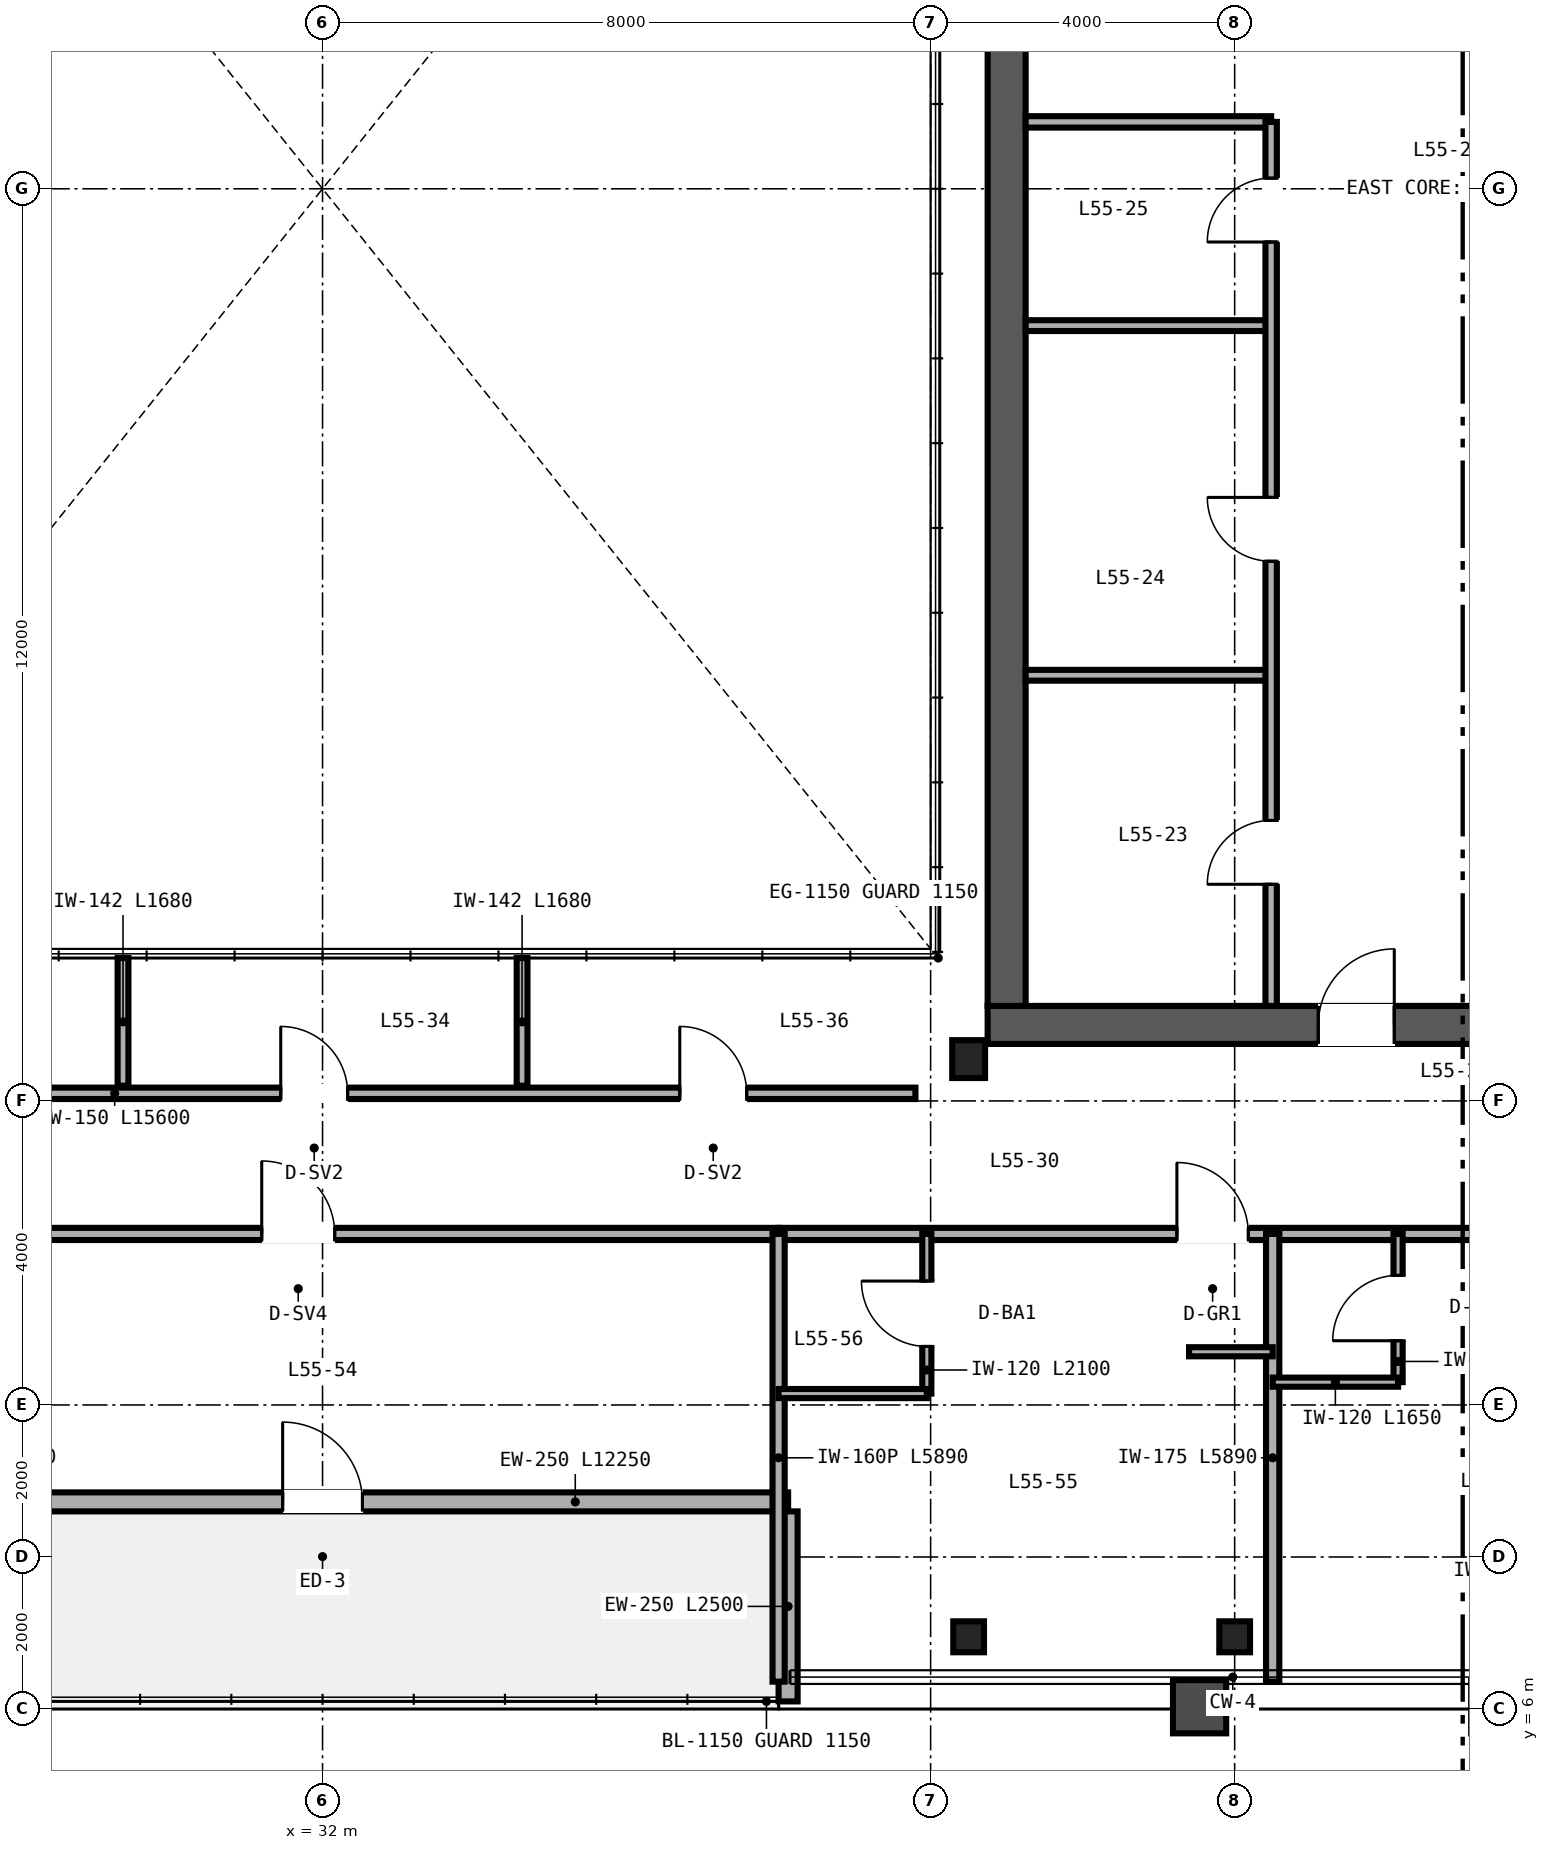
"""IFC4 building model, lengths in metres.
Left out: names, types, materials, properties, quantities, classifications, styles, units other than length and angle.
Written with IfcOpenShell. Run it as: python <this file> out.ifc"""

import sys

from ifc_helpers import new_model, si_unit, direction, frame, frame_2d, origin, origin_2d, place, context, subcontext, project, spatial, rectangle, i_section, extrude, source, transform, mapped, element, fill, save


model = new_model("IFC4")
c1 = context("Model", 3, precision=1e-05, world=origin(), true_north=direction((0.0, 1.0)))
c2 = subcontext(c1, "Body", "Model", "MODEL_VIEW")
j1 = project(units=[si_unit("LENGTHUNIT", "METRE"), si_unit("PLANEANGLEUNIT", "RADIAN")], contexts=[c1])
p1 = place(None, origin())
s1 = spatial("IfcSite", under=j1, at=p1, CompositionType="ELEMENT")
p2 = place(p1, origin())
s2 = spatial("IfcBuilding", under=s1, at=p2, CompositionType="ELEMENT")
p3 = place(p2, frame((0.0, 0.0, 217.2)))
s3 = spatial("IfcBuildingStorey", under=s2, at=p3, CompositionType="ELEMENT", Elevation=217.2)
p4 = place(p3, frame((40.75, 15.0, 0.0), z_axis=(0.0, 0.0, 1.0), x_axis=(1.0, 0.0, 0.0)))
e1 = element("IfcWall", 1, at=p4, inside=s3, PredefinedType="SHEAR", context=c2, shape_type="SweptSolid", body=[
    extrude(rectangle(XDim=12.5, YDim=0.5, at=frame_2d((6.25, 0.0))), origin(), (0.0, 0.0, 1.0), 3.28),
])
p5 = place(p4, frame((4.35, 0.0, 0.0)))
e2 = element("IfcOpeningElement", 2, at=p5, cuts=e1, PredefinedType="OPENING", context=c2, shape_type="SweptSolid", body=[
    extrude(rectangle(XDim=1.0, YDim=2.15, at=frame_2d((0.5, 1.075))), frame((0.0, 0.26, 0.0), z_axis=(0.0, -1.0, 0.0), x_axis=(1.0, 0.0, 0.0)), (0.0, 0.0, 1.0), 0.52),
])
p6 = place(p3, frame((41.0, 15.25, 0.0), z_axis=(0.0, 0.0, 1.0), x_axis=(0.0, 1.0, 0.0)))
e3 = element("IfcWall", 3, at=p6, inside=s3, PredefinedType="SHEAR", context=c2, shape_type="SweptSolid", body=[
    extrude(rectangle(XDim=21.5, YDim=0.5, at=frame_2d((10.75, 0.0))), origin(), (0.0, 0.0, 1.0), 3.28),
])
m1 = source(origin(), c2, "Body", "SweptSolid", [
    extrude(i_section(OverallWidth=0.432, OverallDepth=0.498, WebThickness=0.056, FlangeThickness=0.089, FilletRadius=0.025, at=origin_2d()), origin(), (0.0, 0.0, 1.0), 3.28),
])
p7 = place(p3, frame((40.5, 14.55, 0.0), z_axis=(0.0, 0.0, 1.0), x_axis=(1.0, 0.0, 0.0)))
e4 = element("IfcColumn", 4, at=p7, inside=s3, PredefinedType="COLUMN", context=c2, shape_type="MappedRepresentation", body=[
    mapped(m1, transform((0.0, 0.0, 0.0), scale=1.0)),
])
m2 = source(origin(), c2, "Body", "SweptSolid", [
    extrude(i_section(OverallWidth=0.404, OverallDepth=0.407, WebThickness=0.027, FlangeThickness=0.044, FilletRadius=0.025, at=origin_2d()), origin(), (0.0, 0.0, 1.0), 3.28),
])
for number, where, z_axis, x_axis in (
    (5, (40.5, 6.95, 0.0), (0.0, 0.0, 1.0), (1.0, 0.0, 0.0)),
    (6, (44.0, 6.95, 0.0), (0.0, 0.0, 1.0), (1.0, 0.0, 0.0)),
):
    element("IfcColumn", number, at=place(p3, frame(where, z_axis=z_axis, x_axis=x_axis)), inside=s3, PredefinedType="COLUMN", context=c2, shape_type="MappedRepresentation", body=[
        mapped(m2, transform((0.0, 0.0, 0.0), scale=1.0)),
    ])
p8 = place(p3, frame((25.875, 8.725, 0.0), z_axis=(0.0, 0.0, 1.0), x_axis=(1.0, 0.0, 0.0)))
e7 = element("IfcWall", 7, at=p8, inside=s3, PredefinedType="SOLIDWALL", context=c2, shape_type="SweptSolid", body=[
    extrude(rectangle(XDim=12.25, YDim=0.25, at=frame_2d((6.125, 0.0))), origin(), (0.0, 0.0, 1.0), 3.28),
])
p9 = place(p8, frame((5.6, 0.0, 0.0)))
e8 = element("IfcOpeningElement", 8, at=p9, cuts=e7, PredefinedType="OPENING", context=c2, shape_type="SweptSolid", body=[
    extrude(rectangle(XDim=1.05, YDim=2.15, at=frame_2d((0.525, 1.075))), frame((0.0, 0.135, 0.0), z_axis=(0.0, -1.0, 0.0), x_axis=(1.0, 0.0, 0.0)), (0.0, 0.0, 1.0), 0.27),
])
p10 = place(p3, frame((38.125, 6.1, 0.0), z_axis=(0.0, 0.0, 1.0), x_axis=(0.0, 1.0, 0.0)))
e9 = element("IfcWall", 9, at=p10, inside=s3, PredefinedType="SOLIDWALL", context=c2, shape_type="SweptSolid", body=[
    extrude(rectangle(XDim=2.5, YDim=0.25, at=frame_2d((1.25, 0.0))), origin(), (0.0, 0.0, 1.0), 2.353),
])
p11 = place(p3, frame((41.25, 26.88, 0.0), z_axis=(0.0, 0.0, 1.0), x_axis=(1.0, 0.0, 0.0)))
e10 = element("IfcWall", 10, at=p11, inside=s3, PredefinedType="PARTITIONING", context=c2, shape_type="SweptSolid", body=[
    extrude(rectangle(XDim=3.23, YDim=0.15, at=frame_2d((1.615, 0.0))), origin(), (0.0, 0.0, 1.0), 3.28),
])
for number, where, z_axis, x_axis in (
    (11, (41.25, 19.6, 0.0), (0.0, 0.0, 1.0), (1.0, 0.0, 0.0)),
    (12, (41.25, 24.2, 0.0), (0.0, 0.0, 1.0), (1.0, 0.0, 0.0)),
):
    element("IfcWall", number, at=place(p3, frame(where, z_axis=z_axis, x_axis=x_axis)), inside=s3, PredefinedType="PARTITIONING", context=c2, shape_type="SweptSolid", body=[
        extrude(rectangle(XDim=3.23, YDim=0.142, at=frame_2d((1.615, 0.0))), origin(), (0.0, 0.0, 1.0), 3.28),
    ])
p12 = place(p3, frame((44.48, 15.25, 0.0), z_axis=(0.0, 0.0, 1.0), x_axis=(0.0, 1.0, 0.0)))
e13 = element("IfcWall", 13, at=p12, inside=s3, PredefinedType="PARTITIONING", context=c2, shape_type="SweptSolid", body=[
    extrude(rectangle(XDim=11.63, YDim=0.15, at=frame_2d((5.815, 0.0))), origin(), (0.0, 0.0, 1.0), 3.28),
])
p13 = place(p12, frame((1.6, 0.0, 0.0)))
e14 = element("IfcOpeningElement", 14, at=p13, cuts=e13, PredefinedType="OPENING", context=c2, shape_type="SweptSolid", body=[
    extrude(rectangle(XDim=0.84, YDim=2.1, at=frame_2d((0.42, 1.05))), frame((0.0, 0.085, 0.0), z_axis=(0.0, -1.0, 0.0), x_axis=(1.0, 0.0, 0.0)), (0.0, 0.0, 1.0), 0.17),
])
p14 = place(p12, frame((5.85, 0.0, 0.0)))
e15 = element("IfcOpeningElement", 15, at=p14, cuts=e13, PredefinedType="OPENING", context=c2, shape_type="SweptSolid", body=[
    extrude(rectangle(XDim=0.84, YDim=2.1, at=frame_2d((0.42, 1.05))), frame((0.0, 0.085, 0.0), z_axis=(0.0, -1.0, 0.0), x_axis=(1.0, 0.0, 0.0)), (0.0, 0.0, 1.0), 0.17),
])
p15 = place(p12, frame((10.05, 0.0, 0.0)))
e16 = element("IfcOpeningElement", 16, at=p15, cuts=e13, PredefinedType="OPENING", context=c2, shape_type="SweptSolid", body=[
    extrude(rectangle(XDim=0.84, YDim=2.1, at=frame_2d((0.42, 1.05))), frame((0.0, 0.085, 0.0), z_axis=(0.0, -1.0, 0.0), x_axis=(1.0, 0.0, 0.0)), (0.0, 0.0, 1.0), 0.17),
])
p16 = place(p3, frame((24.2, 14.1, 0.0), z_axis=(0.0, 0.0, 1.0), x_axis=(1.0, 0.0, 0.0)))
e17 = element("IfcWall", 17, at=p16, inside=s3, PredefinedType="PARTITIONING", context=c2, shape_type="SweptSolid", body=[
    extrude(rectangle(XDim=15.6, YDim=0.15, at=frame_2d((7.8, 0.0))), origin(), (0.0, 0.0, 1.0), 3.28),
])
p17 = place(p16, frame((2.0, 0.0, 0.0)))
e18 = element("IfcOpeningElement", 18, at=p17, cuts=e17, PredefinedType="OPENING", context=c2, shape_type="SweptSolid", body=[
    extrude(rectangle(XDim=0.88, YDim=2.15, at=frame_2d((0.44, 1.075))), frame((0.0, 0.085, 0.0), z_axis=(0.0, -1.0, 0.0), x_axis=(1.0, 0.0, 0.0)), (0.0, 0.0, 1.0), 0.17),
])
p18 = place(p16, frame((7.25, 0.0, 0.0)))
e19 = element("IfcOpeningElement", 19, at=p18, cuts=e17, PredefinedType="OPENING", context=c2, shape_type="SweptSolid", body=[
    extrude(rectangle(XDim=0.88, YDim=2.15, at=frame_2d((0.44, 1.075))), frame((0.0, 0.085, 0.0), z_axis=(0.0, -1.0, 0.0), x_axis=(1.0, 0.0, 0.0)), (0.0, 0.0, 1.0), 0.17),
])
p19 = place(p16, frame((12.5, 0.0, 0.0)))
e20 = element("IfcOpeningElement", 20, at=p19, cuts=e17, PredefinedType="OPENING", context=c2, shape_type="SweptSolid", body=[
    extrude(rectangle(XDim=0.88, YDim=2.15, at=frame_2d((0.44, 1.075))), frame((0.0, 0.085, 0.0), z_axis=(0.0, -1.0, 0.0), x_axis=(1.0, 0.0, 0.0)), (0.0, 0.0, 1.0), 0.17),
])
for number, where, z_axis, x_axis in (
    (21, (29.375, 14.2, 0.0), (0.0, 0.0, 1.0), (0.0, 1.0, 0.0)),
    (22, (34.625, 14.2, 0.0), (0.0, 0.0, 1.0), (0.0, 1.0, 0.0)),
):
    element("IfcWall", number, at=place(p3, frame(where, z_axis=z_axis, x_axis=x_axis)), inside=s3, PredefinedType="PARTITIONING", context=c2, shape_type="SweptSolid", body=[
        extrude(rectangle(XDim=1.68, YDim=0.142, at=frame_2d((0.84, 0.0))), origin(), (0.0, 0.0, 1.0), 3.28),
    ])
p20 = place(p3, frame((26.0, 12.25, 0.0), z_axis=(0.0, 0.0, 1.0), x_axis=(1.0, 0.0, 0.0)))
e23 = element("IfcWall", 23, at=p20, inside=s3, PredefinedType="PARTITIONING", context=c2, shape_type="SweptSolid", body=[
    extrude(rectangle(XDim=12.0, YDim=0.16, at=frame_2d((6.0, 0.0))), origin(), (0.0, 0.0, 1.0), 3.28),
])
p21 = place(p20, frame((5.2, 0.0, 0.0)))
e24 = element("IfcOpeningElement", 24, at=p21, cuts=e23, PredefinedType="OPENING", context=c2, shape_type="SweptSolid", body=[
    extrude(rectangle(XDim=0.96, YDim=2.15, at=frame_2d((0.48, 1.075))), frame((0.0, 0.09, 0.0), z_axis=(0.0, -1.0, 0.0), x_axis=(1.0, 0.0, 0.0)), (0.0, 0.0, 1.0), 0.18),
])
p22 = place(p3, frame((38.0, 12.25, 0.0), z_axis=(0.0, 0.0, 1.0), x_axis=(1.0, 0.0, 0.0)))
e25 = element("IfcWall", 25, at=p22, inside=s3, PredefinedType="PARTITIONING", context=c2, shape_type="SweptSolid", body=[
    extrude(rectangle(XDim=12.0, YDim=0.16, at=frame_2d((6.0, 0.0))), origin(), (0.0, 0.0, 1.0), 2.823),
])
p23 = place(p22, frame((5.24, 0.0, 0.0)))
e26 = element("IfcOpeningElement", 26, at=p23, cuts=e25, PredefinedType="OPENING", context=c2, shape_type="SweptSolid", body=[
    extrude(rectangle(XDim=0.94, YDim=2.15, at=frame_2d((0.47, 1.075))), frame((0.0, 0.09, 0.0), z_axis=(0.0, -1.0, 0.0), x_axis=(1.0, 0.0, 0.0)), (0.0, 0.0, 1.0), 0.18),
])
p24 = place(p22, frame((10.74, 0.0, 0.0)))
e27 = element("IfcOpeningElement", 27, at=p24, cuts=e25, PredefinedType="OPENING", context=c2, shape_type="SweptSolid", body=[
    extrude(rectangle(XDim=0.94, YDim=2.15, at=frame_2d((0.47, 1.075))), frame((0.0, 0.09, 0.0), z_axis=(0.0, -1.0, 0.0), x_axis=(1.0, 0.0, 0.0)), (0.0, 0.0, 1.0), 0.18),
])
p25 = place(p3, frame((38.0, 6.36, 0.0), z_axis=(0.0, 0.0, 1.0), x_axis=(0.0, 1.0, 0.0)))
e28 = element("IfcWall", 28, at=p25, inside=s3, PredefinedType="PARTITIONING", context=c2, shape_type="SweptSolid", body=[
    extrude(rectangle(XDim=5.89, YDim=0.16, at=frame_2d((2.945, 0.0))), origin(), (0.0, 0.0, 1.0), 2.36),
])
p26 = place(p3, frame((44.5, 6.36, 0.0), z_axis=(0.0, 0.0, 1.0), x_axis=(0.0, 1.0, 0.0)))
e29 = element("IfcWall", 29, at=p26, inside=s3, PredefinedType="PARTITIONING", context=c2, shape_type="SweptSolid", body=[
    extrude(rectangle(XDim=5.89, YDim=0.175, at=frame_2d((2.945, 0.0))), origin(), (0.0, 0.0, 1.0), 2.587),
])
p27 = place(p3, frame((39.95, 10.15, 0.0), z_axis=(0.0, 0.0, 1.0), x_axis=(0.0, 1.0, 0.0)))
e30 = element("IfcWall", 30, at=p27, inside=s3, PredefinedType="PARTITIONING", context=c2, shape_type="SweptSolid", body=[
    extrude(rectangle(XDim=2.1, YDim=0.12, at=frame_2d((1.05, 0.0))), origin(), (0.0, 0.0, 1.0), 3.28),
])
p28 = place(p27, frame((0.62, 0.0, 0.0)))
e31 = element("IfcOpeningElement", 31, at=p28, cuts=e30, PredefinedType="OPENING", context=c2, shape_type="SweptSolid", body=[
    extrude(rectangle(XDim=0.86, YDim=2.1, at=frame_2d((0.43, 1.05))), frame((0.0, 0.07, 0.0), z_axis=(0.0, -1.0, 0.0), x_axis=(1.0, 0.0, 0.0)), (0.0, 0.0, 1.0), 0.14),
])
p29 = place(p3, frame((38.0, 10.15, 0.0), z_axis=(0.0, 0.0, 1.0), x_axis=(1.0, 0.0, 0.0)))
e32 = element("IfcWall", 32, at=p29, inside=s3, PredefinedType="PARTITIONING", context=c2, shape_type="SweptSolid", body=[
    extrude(rectangle(XDim=1.95, YDim=0.12, at=frame_2d((0.975, 0.0))), origin(), (0.0, 0.0, 1.0), 3.28),
])
p30 = place(p3, frame((43.4, 10.7, 0.0), z_axis=(0.0, 0.0, 1.0), x_axis=(1.0, 0.0, 0.0)))
e33 = element("IfcWall", 33, at=p30, inside=s3, PredefinedType="PARTITIONING", context=c2, shape_type="SweptSolid", body=[
    extrude(rectangle(XDim=1.1, YDim=0.12, at=frame_2d((0.55, 0.0))), origin(), (0.0, 0.0, 1.0), 3.28),
])
p31 = place(p3, frame((46.15, 10.3, 0.0), z_axis=(0.0, 0.0, 1.0), x_axis=(0.0, 1.0, 0.0)))
e34 = element("IfcWall", 34, at=p31, inside=s3, PredefinedType="PARTITIONING", context=c2, shape_type="SweptSolid", body=[
    extrude(rectangle(XDim=1.95, YDim=0.12, at=frame_2d((0.975, 0.0))), origin(), (0.0, 0.0, 1.0), 3.28),
])
p32 = place(p31, frame((0.545, 0.0, 0.0)))
e35 = element("IfcOpeningElement", 35, at=p32, cuts=e34, PredefinedType="OPENING", context=c2, shape_type="SweptSolid", body=[
    extrude(rectangle(XDim=0.86, YDim=2.1, at=frame_2d((0.43, 1.05))), frame((0.0, 0.07, 0.0), z_axis=(0.0, -1.0, 0.0), x_axis=(1.0, 0.0, 0.0)), (0.0, 0.0, 1.0), 0.14),
])
p33 = place(p3, frame((44.5, 10.3, 0.0), z_axis=(0.0, 0.0, 1.0), x_axis=(1.0, 0.0, 0.0)))
e36 = element("IfcWall", 36, at=p33, inside=s3, PredefinedType="PARTITIONING", context=c2, shape_type="SweptSolid", body=[
    extrude(rectangle(XDim=1.65, YDim=0.12, at=frame_2d((0.825, 0.0))), origin(), (0.0, 0.0, 1.0), 3.28),
])
m3 = source(origin(), c2, "Body", "SweptSolid", [
    extrude(rectangle(XDim=1.05, YDim=2.15, at=frame_2d((0.525, 1.075))), frame((0.0, 0.025, 0.0), z_axis=(0.0, -1.0, 0.0), x_axis=(1.0, 0.0, 0.0)), (0.0, 0.0, 1.0), 0.05),
])
p34 = place(p9, origin())
e37 = element("IfcDoor", 37, at=p34, inside=s3, OperationType="SINGLE_SWING_LEFT", PredefinedType="DOOR", context=c2, shape_type="MappedRepresentation", body=[
    mapped(m3, transform((0.0, 0.0, 0.0), scale=1.0)),
])
fill(e8, e37)
m4 = source(origin(), c2, "Body", "SweptSolid", [
    extrude(rectangle(XDim=1.0, YDim=2.15, at=frame_2d((0.5, 1.075))), frame((0.0, 0.025, 0.0), z_axis=(0.0, -1.0, 0.0), x_axis=(1.0, 0.0, 0.0)), (0.0, 0.0, 1.0), 0.05),
])
p35 = place(p5, origin())
e38 = element("IfcDoor", 38, at=p35, inside=s3, OperationType="SINGLE_SWING_RIGHT", PredefinedType="DOOR", context=c2, shape_type="MappedRepresentation", body=[
    mapped(m4, transform((0.0, 0.0, 0.0), scale=1.0)),
])
fill(e2, e38)
m5 = source(origin(), c2, "Body", "SweptSolid", [
    extrude(rectangle(XDim=0.84, YDim=2.1, at=frame_2d((0.42, 1.05))), frame((0.0, 0.025, 0.0), z_axis=(0.0, -1.0, 0.0), x_axis=(1.0, 0.0, 0.0)), (0.0, 0.0, 1.0), 0.05),
])
p36 = place(p13, origin())
e39 = element("IfcDoor", 39, at=p36, inside=s3, OperationType="SINGLE_SWING_LEFT", PredefinedType="DOOR", context=c2, shape_type="MappedRepresentation", body=[
    mapped(m5, transform((0.0, 0.0, 0.0), scale=1.0)),
])
fill(e14, e39)
p37 = place(p14, origin())
e40 = element("IfcDoor", 40, at=p37, inside=s3, OperationType="SINGLE_SWING_RIGHT", PredefinedType="DOOR", context=c2, shape_type="MappedRepresentation", body=[
    mapped(m5, transform((0.0, 0.0, 0.0), scale=1.0)),
])
fill(e15, e40)
p38 = place(p15, origin())
e41 = element("IfcDoor", 41, at=p38, inside=s3, OperationType="SINGLE_SWING_LEFT", PredefinedType="DOOR", context=c2, shape_type="MappedRepresentation", body=[
    mapped(m5, transform((0.0, 0.0, 0.0), scale=1.0)),
])
fill(e16, e41)
m6 = source(origin(), c2, "Body", "SweptSolid", [
    extrude(rectangle(XDim=0.88, YDim=2.15, at=frame_2d((0.44, 1.075))), frame((0.0, 0.025, 0.0), z_axis=(0.0, -1.0, 0.0), x_axis=(1.0, 0.0, 0.0)), (0.0, 0.0, 1.0), 0.05),
])
p39 = place(p18, origin())
e42 = element("IfcDoor", 42, at=p39, inside=s3, OperationType="SINGLE_SWING_LEFT", PredefinedType="DOOR", context=c2, shape_type="MappedRepresentation", body=[
    mapped(m6, transform((0.0, 0.0, 0.0), scale=1.0)),
])
fill(e19, e42)
p40 = place(p19, origin())
e43 = element("IfcDoor", 43, at=p40, inside=s3, OperationType="SINGLE_SWING_LEFT", PredefinedType="DOOR", context=c2, shape_type="MappedRepresentation", body=[
    mapped(m6, transform((0.0, 0.0, 0.0), scale=1.0)),
])
fill(e20, e43)
m7 = source(origin(), c2, "Body", "SweptSolid", [
    extrude(rectangle(XDim=0.96, YDim=2.15, at=frame_2d((0.48, 1.075))), frame((0.0, 0.025, 0.0), z_axis=(0.0, -1.0, 0.0), x_axis=(1.0, 0.0, 0.0)), (0.0, 0.0, 1.0), 0.05),
])
p41 = place(p21, origin())
e44 = element("IfcDoor", 44, at=p41, inside=s3, OperationType="SINGLE_SWING_LEFT", PredefinedType="DOOR", context=c2, shape_type="MappedRepresentation", body=[
    mapped(m7, transform((0.0, 0.0, 0.0), scale=1.0)),
])
fill(e24, e44)
m8 = source(origin(), c2, "Body", "SweptSolid", [
    extrude(rectangle(XDim=0.86, YDim=2.1, at=frame_2d((0.43, 1.05))), frame((0.0, 0.025, 0.0), z_axis=(0.0, -1.0, 0.0), x_axis=(1.0, 0.0, 0.0)), (0.0, 0.0, 1.0), 0.05),
])
p42 = place(p28, origin())
e45 = element("IfcDoor", 45, at=p42, inside=s3, OperationType="SINGLE_SWING_RIGHT", PredefinedType="DOOR", context=c2, shape_type="MappedRepresentation", body=[
    mapped(m8, transform((0.0, 0.0, 0.0), scale=1.0)),
])
fill(e31, e45)
p43 = place(p32, origin())
e46 = element("IfcDoor", 46, at=p43, inside=s3, OperationType="SINGLE_SWING_LEFT", PredefinedType="DOOR", context=c2, shape_type="MappedRepresentation", body=[
    mapped(m8, transform((0.0, 0.0, 0.0), scale=1.0)),
])
fill(e35, e46)
m9 = source(origin(), c2, "Body", "SweptSolid", [
    extrude(rectangle(XDim=0.94, YDim=2.15, at=frame_2d((0.47, 1.075))), frame((0.0, 0.025, 0.0), z_axis=(0.0, -1.0, 0.0), x_axis=(1.0, 0.0, 0.0)), (0.0, 0.0, 1.0), 0.05),
])
p44 = place(p23, origin())
e47 = element("IfcDoor", 47, at=p44, inside=s3, OperationType="SINGLE_SWING_LEFT", PredefinedType="DOOR", context=c2, shape_type="MappedRepresentation", body=[
    mapped(m9, transform((0.0, 0.0, 0.0), scale=1.0)),
])
fill(e26, e47)
save(model, sys.argv[1])
